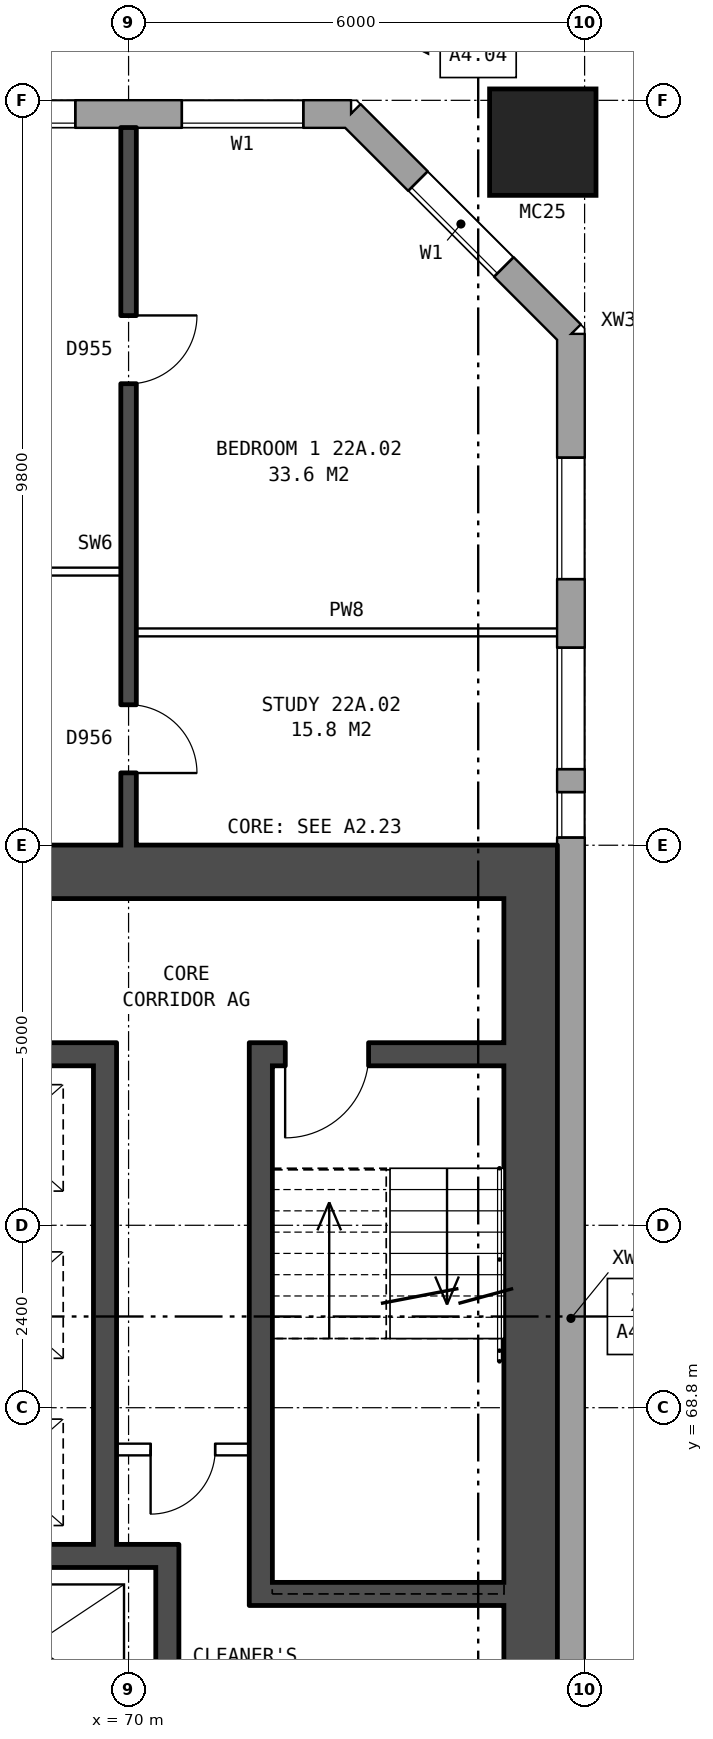
"""IFC4 building model, lengths in metres.
Left out: names, types, materials, properties, quantities, classifications, styles, units other than length and angle.
Written with IfcOpenShell. Run it as: python <this file> out.ifc"""

import sys

from ifc_helpers import new_model, si_unit, direction, frame, frame_2d, origin, origin_2d, place, context, subcontext, project, spatial, rectangle, hollow_rectangle, extrude, element, fill, save


model = new_model("IFC4")
c1 = context("Model", 3, precision=1e-05, world=origin(), true_north=direction((0.0, 1.0)))
c2 = subcontext(c1, "Body", "Model", "MODEL_VIEW")
j1 = project(units=[si_unit("LENGTHUNIT", "METRE"), si_unit("PLANEANGLEUNIT", "RADIAN")], contexts=[c1])
p1 = place(None, origin())
s1 = spatial("IfcSite", under=j1, at=p1, CompositionType="ELEMENT")
p2 = place(p1, origin())
s2 = spatial("IfcBuilding", under=s1, at=p2, CompositionType="ELEMENT")
p3 = place(p2, frame((0.0, 0.0, 80.9)))
s3 = spatial("IfcBuildingStorey", under=s2, at=p3, CompositionType="ELEMENT", Elevation=80.9)
p4 = place(p3, frame((75.45, 85.45, 0.0), z_axis=(0.0, 0.0, 1.0), x_axis=(1.0, 0.0, 0.0)))
e1 = element("IfcColumn", 1, at=p4, inside=s3, PredefinedType="COLUMN", context=c2, shape_type="SweptSolid", body=[
    extrude(hollow_rectangle(XDim=1.4, YDim=1.4, WallThickness=0.075, at=origin_2d()), origin(), (0.0, 0.0, 1.0), 3.1),
])
p5 = place(p3, frame((75.82, 57.075, 0.0), z_axis=(0.0, 0.0, 1.0), x_axis=(0.0, 1.0, 0.0)))
e2 = element("IfcWall", 2, at=p5, inside=s3, PredefinedType="STANDARD", context=c2, shape_type="SweptSolid", body=[
    extrude(rectangle(XDim=25.851, YDim=0.36, at=frame_2d((12.925, 0.0))), origin(), (0.0, 0.0, 1.0), 2.85),
])
p6 = place(p5, frame((1.625, 0.0, 0.8)))
e3 = element("IfcOpeningElement", 3, at=p6, cuts=e2, PredefinedType="OPENING", context=c2, shape_type="SweptSolid", body=[
    extrude(rectangle(XDim=1.6, YDim=1.8, at=frame_2d((0.8, 0.9))), frame((0.0, 0.19, 0.0), z_axis=(0.0, -1.0, 0.0), x_axis=(1.0, 0.0, 0.0)), (0.0, 0.0, 1.0), 0.38),
])
p7 = place(p5, frame((4.075, 0.0, 0.8)))
e4 = element("IfcOpeningElement", 4, at=p7, cuts=e2, PredefinedType="OPENING", context=c2, shape_type="SweptSolid", body=[
    extrude(rectangle(XDim=1.6, YDim=1.8, at=frame_2d((0.8, 0.9))), frame((0.0, 0.19, 0.0), z_axis=(0.0, -1.0, 0.0), x_axis=(1.0, 0.0, 0.0)), (0.0, 0.0, 1.0), 0.38),
])
p8 = place(p5, frame((19.225, 0.0, 0.8)))
e5 = element("IfcOpeningElement", 5, at=p8, cuts=e2, PredefinedType="OPENING", context=c2, shape_type="SweptSolid", body=[
    extrude(rectangle(XDim=0.6, YDim=1.2, at=frame_2d((0.3, 0.6))), frame((0.0, 0.19, 0.0), z_axis=(0.0, -1.0, 0.0), x_axis=(1.0, 0.0, 0.0)), (0.0, 0.0, 1.0), 0.38),
])
p9 = place(p5, frame((22.625, 0.0, 0.8)))
e6 = element("IfcOpeningElement", 6, at=p9, cuts=e2, PredefinedType="OPENING", context=c2, shape_type="SweptSolid", body=[
    extrude(rectangle(XDim=1.6, YDim=1.8, at=frame_2d((0.8, 0.9))), frame((0.0, 0.19, 0.0), z_axis=(0.0, -1.0, 0.0), x_axis=(1.0, 0.0, 0.0)), (0.0, 0.0, 1.0), 0.38),
])
p10 = place(p5, frame((5.975, 0.0, 0.8)))
e7 = element("IfcOpeningElement", 7, at=p10, cuts=e2, PredefinedType="OPENING", context=c2, shape_type="SweptSolid", body=[
    extrude(rectangle(XDim=0.6, YDim=1.2, at=frame_2d((0.3, 0.6))), frame((0.0, 0.19, 0.0), z_axis=(0.0, -1.0, 0.0), x_axis=(1.0, 0.0, 0.0)), (0.0, 0.0, 1.0), 0.38),
])
p11 = place(p5, frame((20.125, 0.0, 0.8)))
e8 = element("IfcOpeningElement", 8, at=p11, cuts=e2, PredefinedType="OPENING", context=c2, shape_type="SweptSolid", body=[
    extrude(rectangle(XDim=1.6, YDim=1.8, at=frame_2d((0.8, 0.9))), frame((0.0, 0.19, 0.0), z_axis=(0.0, -1.0, 0.0), x_axis=(1.0, 0.0, 0.0)), (0.0, 0.0, 1.0), 0.38),
])
p12 = place(p3, frame((75.82, 82.925, 0.0), z_axis=(0.0, 0.0, 1.0), x_axis=(-0.707106781187, 0.707106781187, 0.0)))
e9 = element("IfcWall", 9, at=p12, inside=s3, PredefinedType="STANDARD", context=c2, shape_type="SweptSolid", body=[
    extrude(rectangle(XDim=4.094, YDim=0.36, at=frame_2d((2.047, 0.0))), origin(), (0.0, 0.0, 1.0), 2.85),
])
p13 = place(p12, frame((1.247, 0.0, 0.8)))
e10 = element("IfcOpeningElement", 10, at=p13, cuts=e9, PredefinedType="OPENING", context=c2, shape_type="SweptSolid", body=[
    extrude(rectangle(XDim=1.6, YDim=1.8, at=frame_2d((0.8, 0.9))), frame((0.0, 0.19, 0.0), z_axis=(0.0, -1.0, 0.0), x_axis=(1.0, 0.0, 0.0)), (0.0, 0.0, 1.0), 0.38),
])
p14 = place(p3, frame((72.925, 85.82, 0.0), z_axis=(0.0, 0.0, 1.0), x_axis=(-1.0, 0.0, 0.0)))
e11 = element("IfcWall", 11, at=p14, inside=s3, PredefinedType="STANDARD", context=c2, shape_type="SweptSolid", body=[
    extrude(rectangle(XDim=46.601, YDim=0.36, at=frame_2d((23.3, 0.0))), origin(), (0.0, 0.0, 1.0), 2.85),
])
p15 = place(p14, frame((0.625, 0.0, 0.8)))
e12 = element("IfcOpeningElement", 12, at=p15, cuts=e11, PredefinedType="OPENING", context=c2, shape_type="SweptSolid", body=[
    extrude(rectangle(XDim=1.6, YDim=1.8, at=frame_2d((0.8, 0.9))), frame((0.0, 0.19, 0.0), z_axis=(0.0, -1.0, 0.0), x_axis=(1.0, 0.0, 0.0)), (0.0, 0.0, 1.0), 0.38),
])
p16 = place(p14, frame((3.625, 0.0, 0.8)))
e13 = element("IfcOpeningElement", 13, at=p16, cuts=e11, PredefinedType="OPENING", context=c2, shape_type="SweptSolid", body=[
    extrude(rectangle(XDim=1.6, YDim=1.8, at=frame_2d((0.8, 0.9))), frame((0.0, 0.19, 0.0), z_axis=(0.0, -1.0, 0.0), x_axis=(1.0, 0.0, 0.0)), (0.0, 0.0, 1.0), 0.38),
])
p17 = place(p14, frame((6.625, 0.0, 0.8)))
e14 = element("IfcOpeningElement", 14, at=p17, cuts=e11, PredefinedType="OPENING", context=c2, shape_type="SweptSolid", body=[
    extrude(rectangle(XDim=1.6, YDim=1.8, at=frame_2d((0.8, 0.9))), frame((0.0, 0.19, 0.0), z_axis=(0.0, -1.0, 0.0), x_axis=(1.0, 0.0, 0.0)), (0.0, 0.0, 1.0), 0.38),
])
p18 = place(p14, frame((9.625, 0.0, 0.8)))
e15 = element("IfcOpeningElement", 15, at=p18, cuts=e11, PredefinedType="OPENING", context=c2, shape_type="SweptSolid", body=[
    extrude(rectangle(XDim=1.6, YDim=1.8, at=frame_2d((0.8, 0.9))), frame((0.0, 0.19, 0.0), z_axis=(0.0, -1.0, 0.0), x_axis=(1.0, 0.0, 0.0)), (0.0, 0.0, 1.0), 0.38),
])
p19 = place(p14, frame((12.075, 0.0, 0.8)))
e16 = element("IfcOpeningElement", 16, at=p19, cuts=e11, PredefinedType="OPENING", context=c2, shape_type="SweptSolid", body=[
    extrude(rectangle(XDim=1.0, YDim=1.8, at=frame_2d((0.5, 0.9))), frame((0.0, 0.19, 0.0), z_axis=(0.0, -1.0, 0.0), x_axis=(1.0, 0.0, 0.0)), (0.0, 0.0, 1.0), 0.38),
])
p20 = place(p14, frame((15.325, 0.0, 0.65)))
e17 = element("IfcOpeningElement", 17, at=p20, cuts=e11, PredefinedType="OPENING", context=c2, shape_type="SweptSolid", body=[
    extrude(rectangle(XDim=0.6, YDim=0.9, at=frame_2d((0.3, 0.45))), frame((0.0, 0.19, 0.0), z_axis=(0.0, -1.0, 0.0), x_axis=(1.0, 0.0, 0.0)), (0.0, 0.0, 1.0), 0.38),
])
p21 = place(p14, frame((18.625, 0.0, 0.8)))
e18 = element("IfcOpeningElement", 18, at=p21, cuts=e11, PredefinedType="OPENING", context=c2, shape_type="SweptSolid", body=[
    extrude(rectangle(XDim=1.6, YDim=1.8, at=frame_2d((0.8, 0.9))), frame((0.0, 0.19, 0.0), z_axis=(0.0, -1.0, 0.0), x_axis=(1.0, 0.0, 0.0)), (0.0, 0.0, 1.0), 0.38),
])
p22 = place(p14, frame((21.625, 0.0, 0.8)))
e19 = element("IfcOpeningElement", 19, at=p22, cuts=e11, PredefinedType="OPENING", context=c2, shape_type="SweptSolid", body=[
    extrude(rectangle(XDim=1.6, YDim=1.8, at=frame_2d((0.8, 0.9))), frame((0.0, 0.19, 0.0), z_axis=(0.0, -1.0, 0.0), x_axis=(1.0, 0.0, 0.0)), (0.0, 0.0, 1.0), 0.38),
])
p23 = place(p14, frame((24.625, 0.0, 0.8)))
e20 = element("IfcOpeningElement", 20, at=p23, cuts=e11, PredefinedType="OPENING", context=c2, shape_type="SweptSolid", body=[
    extrude(rectangle(XDim=1.6, YDim=1.8, at=frame_2d((0.8, 0.9))), frame((0.0, 0.19, 0.0), z_axis=(0.0, -1.0, 0.0), x_axis=(1.0, 0.0, 0.0)), (0.0, 0.0, 1.0), 0.38),
])
p24 = place(p14, frame((27.625, 0.0, 0.8)))
e21 = element("IfcOpeningElement", 21, at=p24, cuts=e11, PredefinedType="OPENING", context=c2, shape_type="SweptSolid", body=[
    extrude(rectangle(XDim=1.6, YDim=1.8, at=frame_2d((0.8, 0.9))), frame((0.0, 0.19, 0.0), z_axis=(0.0, -1.0, 0.0), x_axis=(1.0, 0.0, 0.0)), (0.0, 0.0, 1.0), 0.38),
])
p25 = place(p14, frame((29.525, 0.0, 0.8)))
e22 = element("IfcOpeningElement", 22, at=p25, cuts=e11, PredefinedType="OPENING", context=c2, shape_type="SweptSolid", body=[
    extrude(rectangle(XDim=1.2, YDim=1.2, at=frame_2d((0.6, 0.6))), frame((0.0, 0.19, 0.0), z_axis=(0.0, -1.0, 0.0), x_axis=(1.0, 0.0, 0.0)), (0.0, 0.0, 1.0), 0.38),
])
p26 = place(p14, frame((33.625, 0.0, 0.8)))
e23 = element("IfcOpeningElement", 23, at=p26, cuts=e11, PredefinedType="OPENING", context=c2, shape_type="SweptSolid", body=[
    extrude(rectangle(XDim=1.6, YDim=1.8, at=frame_2d((0.8, 0.9))), frame((0.0, 0.19, 0.0), z_axis=(0.0, -1.0, 0.0), x_axis=(1.0, 0.0, 0.0)), (0.0, 0.0, 1.0), 0.38),
])
p27 = place(p14, frame((36.625, 0.0, 0.8)))
e24 = element("IfcOpeningElement", 24, at=p27, cuts=e11, PredefinedType="OPENING", context=c2, shape_type="SweptSolid", body=[
    extrude(rectangle(XDim=1.6, YDim=1.8, at=frame_2d((0.8, 0.9))), frame((0.0, 0.19, 0.0), z_axis=(0.0, -1.0, 0.0), x_axis=(1.0, 0.0, 0.0)), (0.0, 0.0, 1.0), 0.38),
])
p28 = place(p14, frame((39.625, 0.0, 0.8)))
e25 = element("IfcOpeningElement", 25, at=p28, cuts=e11, PredefinedType="OPENING", context=c2, shape_type="SweptSolid", body=[
    extrude(rectangle(XDim=1.6, YDim=1.8, at=frame_2d((0.8, 0.9))), frame((0.0, 0.19, 0.0), z_axis=(0.0, -1.0, 0.0), x_axis=(1.0, 0.0, 0.0)), (0.0, 0.0, 1.0), 0.38),
])
p29 = place(p14, frame((42.625, 0.0, 0.8)))
e26 = element("IfcOpeningElement", 26, at=p29, cuts=e11, PredefinedType="OPENING", context=c2, shape_type="SweptSolid", body=[
    extrude(rectangle(XDim=1.6, YDim=1.8, at=frame_2d((0.8, 0.9))), frame((0.0, 0.19, 0.0), z_axis=(0.0, -1.0, 0.0), x_axis=(1.0, 0.0, 0.0)), (0.0, 0.0, 1.0), 0.38),
])
p30 = place(p14, frame((13.375, 0.0, 1.7)))
e27 = element("IfcOpeningElement", 27, at=p30, cuts=e11, PredefinedType="OPENING", context=c2, shape_type="SweptSolid", body=[
    extrude(rectangle(XDim=0.8, YDim=0.9, at=frame_2d((0.4, 0.45))), frame((0.0, 0.19, 0.0), z_axis=(0.0, -1.0, 0.0), x_axis=(1.0, 0.0, 0.0)), (0.0, 0.0, 1.0), 0.38),
])
p31 = place(p14, frame((16.375, 0.0, 0.65)))
e28 = element("IfcOpeningElement", 28, at=p31, cuts=e11, PredefinedType="OPENING", context=c2, shape_type="SweptSolid", body=[
    extrude(rectangle(XDim=1.4, YDim=1.8, at=frame_2d((0.7, 0.9))), frame((0.0, 0.19, 0.0), z_axis=(0.0, -1.0, 0.0), x_axis=(1.0, 0.0, 0.0)), (0.0, 0.0, 1.0), 0.38),
])
p32 = place(p3, frame((75.29, 64.5, 0.0), z_axis=(0.0, 0.0, 1.0), x_axis=(0.0, 1.0, 0.0)))
e29 = element("IfcWall", 29, at=p32, inside=s3, PredefinedType="SHEAR", context=c2, shape_type="SweptSolid", body=[
    extrude(rectangle(XDim=11.0, YDim=0.7, at=frame_2d((5.5, 0.0))), origin(), (0.0, 0.0, 1.0), 2.85),
])
p33 = place(p3, frame((66.64, 75.85, 0.0), z_axis=(0.0, 0.0, 1.0), x_axis=(1.0, 0.0, 0.0)))
e30 = element("IfcWall", 30, at=p33, inside=s3, PredefinedType="SHEAR", context=c2, shape_type="SweptSolid", body=[
    extrude(rectangle(XDim=9.0, YDim=0.7, at=frame_2d((4.5, 0.0))), origin(), (0.0, 0.0, 1.0), 2.85),
])
p34 = place(p3, frame((71.89, 66.35, 0.0), z_axis=(0.0, 0.0, 1.0), x_axis=(1.0, 0.0, 0.0)))
e31 = element("IfcWall", 31, at=p34, inside=s3, PredefinedType="SHEAR", context=c2, shape_type="SweptSolid", body=[
    extrude(rectangle(XDim=3.05, YDim=0.3, at=frame_2d((1.525, 0.0))), origin(), (0.0, 0.0, 1.0), 2.85),
])
p35 = place(p3, frame((67.34, 66.85, 0.0), z_axis=(0.0, 0.0, 1.0), x_axis=(1.0, 0.0, 0.0)))
e32 = element("IfcWall", 32, at=p35, inside=s3, PredefinedType="SHEAR", context=c2, shape_type="SweptSolid", body=[
    extrude(rectangle(XDim=3.32, YDim=0.3, at=frame_2d((1.66, 0.0))), origin(), (0.0, 0.0, 1.0), 2.85),
])
p36 = place(p3, frame((69.84, 68.25, 0.0), z_axis=(0.0, 0.0, 1.0), x_axis=(1.0, 0.0, 0.0)))
e33 = element("IfcWall", 33, at=p36, inside=s3, PredefinedType="PARTITIONING", context=c2, shape_type="SweptSolid", body=[
    extrude(rectangle(XDim=1.75, YDim=0.15, at=frame_2d((0.875, 0.0))), origin(), (0.0, 0.0, 1.0), 2.85),
])
p37 = place(p36, frame((0.45, 0.0, 0.0)))
e34 = element("IfcOpeningElement", 34, at=p37, cuts=e33, PredefinedType="OPENING", context=c2, shape_type="SweptSolid", body=[
    extrude(rectangle(XDim=0.85, YDim=2.1, at=frame_2d((0.425, 1.05))), frame((0.0, 0.085, 0.0), z_axis=(0.0, -1.0, 0.0), x_axis=(1.0, 0.0, 0.0)), (0.0, 0.0, 1.0), 0.17),
])
p38 = place(p3, frame((67.34, 73.45, 0.0), z_axis=(0.0, 0.0, 1.0), x_axis=(1.0, 0.0, 0.0)))
e35 = element("IfcWall", 35, at=p38, inside=s3, PredefinedType="SHEAR", context=c2, shape_type="SweptSolid", body=[
    extrude(rectangle(XDim=2.2, YDim=0.3, at=frame_2d((1.1, 0.0))), origin(), (0.0, 0.0, 1.0), 2.85),
])
p39 = place(p3, frame((71.89, 73.45, 0.0), z_axis=(0.0, 0.0, 1.0), x_axis=(1.0, 0.0, 0.0)))
e36 = element("IfcWall", 36, at=p39, inside=s3, PredefinedType="SHEAR", context=c2, shape_type="SweptSolid", body=[
    extrude(rectangle(XDim=3.05, YDim=0.3, at=frame_2d((1.525, 0.0))), origin(), (0.0, 0.0, 1.0), 2.85),
])
p40 = place(p39, frame((0.17, 0.0, 0.0)))
e37 = element("IfcOpeningElement", 37, at=p40, cuts=e36, PredefinedType="OPENING", context=c2, shape_type="SweptSolid", body=[
    extrude(rectangle(XDim=1.1, YDim=2.1, at=frame_2d((0.55, 1.05))), frame((0.0, 0.16, 0.0), z_axis=(0.0, -1.0, 0.0), x_axis=(1.0, 0.0, 0.0)), (0.0, 0.0, 1.0), 0.32),
])
p41 = place(p3, frame((69.69, 67.0, 0.0), z_axis=(0.0, 0.0, 1.0), x_axis=(0.0, 1.0, 0.0)))
e38 = element("IfcWall", 38, at=p41, inside=s3, PredefinedType="SHEAR", context=c2, shape_type="SweptSolid", body=[
    extrude(rectangle(XDim=6.6, YDim=0.3, at=frame_2d((3.3, 0.0))), origin(), (0.0, 0.0, 1.0), 2.85),
])
p42 = place(p3, frame((70.51, 64.5, 0.0), z_axis=(0.0, 0.0, 1.0), x_axis=(0.0, 1.0, 0.0)))
e39 = element("IfcWall", 39, at=p42, inside=s3, PredefinedType="SHEAR", context=c2, shape_type="SweptSolid", body=[
    extrude(rectangle(XDim=2.2, YDim=0.3, at=frame_2d((1.1, 0.0))), origin(), (0.0, 0.0, 1.0), 2.85),
])
p43 = place(p3, frame((71.74, 66.2, 0.0), z_axis=(0.0, 0.0, 1.0), x_axis=(0.0, 1.0, 0.0)))
e40 = element("IfcWall", 40, at=p43, inside=s3, PredefinedType="SHEAR", context=c2, shape_type="SweptSolid", body=[
    extrude(rectangle(XDim=7.4, YDim=0.3, at=frame_2d((3.7, 0.0))), origin(), (0.0, 0.0, 1.0), 2.85),
])
p44 = place(p3, frame((70.1, 79.0, 0.0), z_axis=(0.0, 0.0, 1.0), x_axis=(1.0, 0.0, 0.0)))
e41 = element("IfcWall", 41, at=p44, inside=s3, PredefinedType="PARTITIONING", context=c2, shape_type="SweptSolid", body=[
    extrude(rectangle(XDim=5.54, YDim=0.1, at=frame_2d((2.77, 0.0))), origin(), (0.0, 0.0, 1.0), 2.85),
])
p45 = place(p3, frame((64.1, 79.8, 0.0), z_axis=(0.0, 0.0, 1.0), x_axis=(1.0, 0.0, 0.0)))
e42 = element("IfcWall", 42, at=p45, inside=s3, PredefinedType="PARTITIONING", context=c2, shape_type="SweptSolid", body=[
    extrude(rectangle(XDim=5.8, YDim=0.1, at=frame_2d((2.9, 0.0))), origin(), (0.0, 0.0, 1.0), 2.85),
])
p46 = place(p45, frame((3.6, 0.0, 0.0)))
e43 = element("IfcOpeningElement", 43, at=p46, cuts=e42, PredefinedType="OPENING", context=c2, shape_type="SweptSolid", body=[
    extrude(rectangle(XDim=0.9, YDim=2.1, at=frame_2d((0.45, 1.05))), frame((0.0, 0.06, 0.0), z_axis=(0.0, -1.0, 0.0), x_axis=(1.0, 0.0, 0.0)), (0.0, 0.0, 1.0), 0.12),
])
p47 = place(p45, frame((0.7, 0.0, 0.0)))
e44 = element("IfcOpeningElement", 44, at=p47, cuts=e42, PredefinedType="OPENING", context=c2, shape_type="SweptSolid", body=[
    extrude(rectangle(XDim=0.9, YDim=2.1, at=frame_2d((0.45, 1.05))), frame((0.0, 0.06, 0.0), z_axis=(0.0, -1.0, 0.0), x_axis=(1.0, 0.0, 0.0)), (0.0, 0.0, 1.0), 0.12),
])
p48 = place(p3, frame((70.0, 76.2, 0.0), z_axis=(0.0, 0.0, 1.0), x_axis=(0.0, 1.0, 0.0)))
e45 = element("IfcWall", 45, at=p48, inside=s3, PredefinedType="SOLIDWALL", context=c2, shape_type="SweptSolid", body=[
    extrude(rectangle(XDim=9.44, YDim=0.2, at=frame_2d((4.72, 0.0))), origin(), (0.0, 0.0, 1.0), 2.85),
])
p49 = place(p48, frame((6.07, 0.0, 0.0)))
e46 = element("IfcOpeningElement", 46, at=p49, cuts=e45, PredefinedType="OPENING", context=c2, shape_type="SweptSolid", body=[
    extrude(rectangle(XDim=0.9, YDim=2.1, at=frame_2d((0.45, 1.05))), frame((0.0, 0.11, 0.0), z_axis=(0.0, -1.0, 0.0), x_axis=(1.0, 0.0, 0.0)), (0.0, 0.0, 1.0), 0.22),
])
p50 = place(p48, frame((0.95, 0.0, 0.0)))
e47 = element("IfcOpeningElement", 47, at=p50, cuts=e45, PredefinedType="OPENING", context=c2, shape_type="SweptSolid", body=[
    extrude(rectangle(XDim=0.9, YDim=2.1, at=frame_2d((0.45, 1.05))), frame((0.0, 0.11, 0.0), z_axis=(0.0, -1.0, 0.0), x_axis=(1.0, 0.0, 0.0)), (0.0, 0.0, 1.0), 0.22),
])
p51 = place(p8, origin())
e48 = element("IfcWindow", 48, at=p51, inside=s3, PartitioningType="SINGLE_PANEL", PredefinedType="WINDOW", context=c2, shape_type="SweptSolid", body=[
    extrude(rectangle(XDim=0.6, YDim=1.2, at=frame_2d((0.3, 0.6))), frame((0.0, 0.15, 0.0), z_axis=(0.0, -1.0, 0.0), x_axis=(1.0, 0.0, 0.0)), (0.0, 0.0, 1.0), 0.06),
])
fill(e5, e48)
p52 = place(p9, origin())
e49 = element("IfcWindow", 49, at=p52, inside=s3, PartitioningType="SINGLE_PANEL", PredefinedType="WINDOW", context=c2, shape_type="SweptSolid", body=[
    extrude(rectangle(XDim=1.6, YDim=1.8, at=frame_2d((0.8, 0.9))), frame((0.0, 0.15, 0.0), z_axis=(0.0, -1.0, 0.0), x_axis=(1.0, 0.0, 0.0)), (0.0, 0.0, 1.0), 0.06),
])
fill(e6, e49)
p53 = place(p13, origin())
e50 = element("IfcWindow", 50, at=p53, inside=s3, PartitioningType="SINGLE_PANEL", PredefinedType="WINDOW", context=c2, shape_type="SweptSolid", body=[
    extrude(rectangle(XDim=1.6, YDim=1.8, at=frame_2d((0.8, 0.9))), frame((0.0, 0.15, 0.0), z_axis=(0.0, -1.0, 0.0), x_axis=(1.0, 0.0, 0.0)), (0.0, 0.0, 1.0), 0.06),
])
fill(e10, e50)
p54 = place(p15, origin())
e51 = element("IfcWindow", 51, at=p54, inside=s3, PartitioningType="SINGLE_PANEL", PredefinedType="WINDOW", context=c2, shape_type="SweptSolid", body=[
    extrude(rectangle(XDim=1.6, YDim=1.8, at=frame_2d((0.8, 0.9))), frame((0.0, 0.15, 0.0), z_axis=(0.0, -1.0, 0.0), x_axis=(1.0, 0.0, 0.0)), (0.0, 0.0, 1.0), 0.06),
])
fill(e12, e51)
p55 = place(p16, origin())
e52 = element("IfcWindow", 52, at=p55, inside=s3, PartitioningType="SINGLE_PANEL", PredefinedType="WINDOW", context=c2, shape_type="SweptSolid", body=[
    extrude(rectangle(XDim=1.6, YDim=1.8, at=frame_2d((0.8, 0.9))), frame((0.0, 0.15, 0.0), z_axis=(0.0, -1.0, 0.0), x_axis=(1.0, 0.0, 0.0)), (0.0, 0.0, 1.0), 0.06),
])
fill(e13, e52)
p56 = place(p40, frame((1.1, 0.0, 0.0), z_axis=(0.0, 0.0, 1.0), x_axis=(-1.0, 0.0, 0.0)))
e53 = element("IfcDoor", 53, at=p56, inside=s3, OperationType="SINGLE_SWING_RIGHT", PredefinedType="DOOR", context=c2, shape_type="SweptSolid", body=[
    extrude(rectangle(XDim=1.1, YDim=2.1, at=frame_2d((0.55, 1.05))), frame((0.0, 0.025, 0.0), z_axis=(0.0, -1.0, 0.0), x_axis=(1.0, 0.0, 0.0)), (0.0, 0.0, 1.0), 0.05),
])
fill(e37, e53)
p57 = place(p37, frame((0.85, 0.0, 0.0), z_axis=(0.0, 0.0, 1.0), x_axis=(-1.0, 0.0, 0.0)))
e54 = element("IfcDoor", 54, at=p57, inside=s3, OperationType="SINGLE_SWING_RIGHT", PredefinedType="DOOR", context=c2, shape_type="SweptSolid", body=[
    extrude(rectangle(XDim=0.85, YDim=2.1, at=frame_2d((0.425, 1.05))), frame((0.0, 0.025, 0.0), z_axis=(0.0, -1.0, 0.0), x_axis=(1.0, 0.0, 0.0)), (0.0, 0.0, 1.0), 0.05),
])
fill(e34, e54)
p58 = place(p49, frame((0.9, 0.0, 0.0), z_axis=(0.0, 0.0, 1.0), x_axis=(-1.0, 0.0, 0.0)))
e55 = element("IfcDoor", 55, at=p58, inside=s3, OperationType="SINGLE_SWING_LEFT", PredefinedType="DOOR", context=c2, shape_type="SweptSolid", body=[
    extrude(rectangle(XDim=0.9, YDim=2.1, at=frame_2d((0.45, 1.05))), frame((0.0, 0.025, 0.0), z_axis=(0.0, -1.0, 0.0), x_axis=(1.0, 0.0, 0.0)), (0.0, 0.0, 1.0), 0.05),
])
fill(e46, e55)
p59 = place(p50, frame((0.9, 0.0, 0.0), z_axis=(0.0, 0.0, 1.0), x_axis=(-1.0, 0.0, 0.0)))
e56 = element("IfcDoor", 56, at=p59, inside=s3, OperationType="SINGLE_SWING_RIGHT", PredefinedType="DOOR", context=c2, shape_type="SweptSolid", body=[
    extrude(rectangle(XDim=0.9, YDim=2.1, at=frame_2d((0.45, 1.05))), frame((0.0, 0.025, 0.0), z_axis=(0.0, -1.0, 0.0), x_axis=(1.0, 0.0, 0.0)), (0.0, 0.0, 1.0), 0.05),
])
fill(e47, e56)
p60 = place(p11, origin())
e57 = element("IfcWindow", 57, at=p60, inside=s3, PartitioningType="SINGLE_PANEL", PredefinedType="WINDOW", context=c2, shape_type="SweptSolid", body=[
    extrude(rectangle(XDim=1.6, YDim=1.8, at=frame_2d((0.8, 0.9))), frame((0.0, 0.15, 0.0), z_axis=(0.0, -1.0, 0.0), x_axis=(1.0, 0.0, 0.0)), (0.0, 0.0, 1.0), 0.06),
])
fill(e8, e57)
save(model, sys.argv[1])
